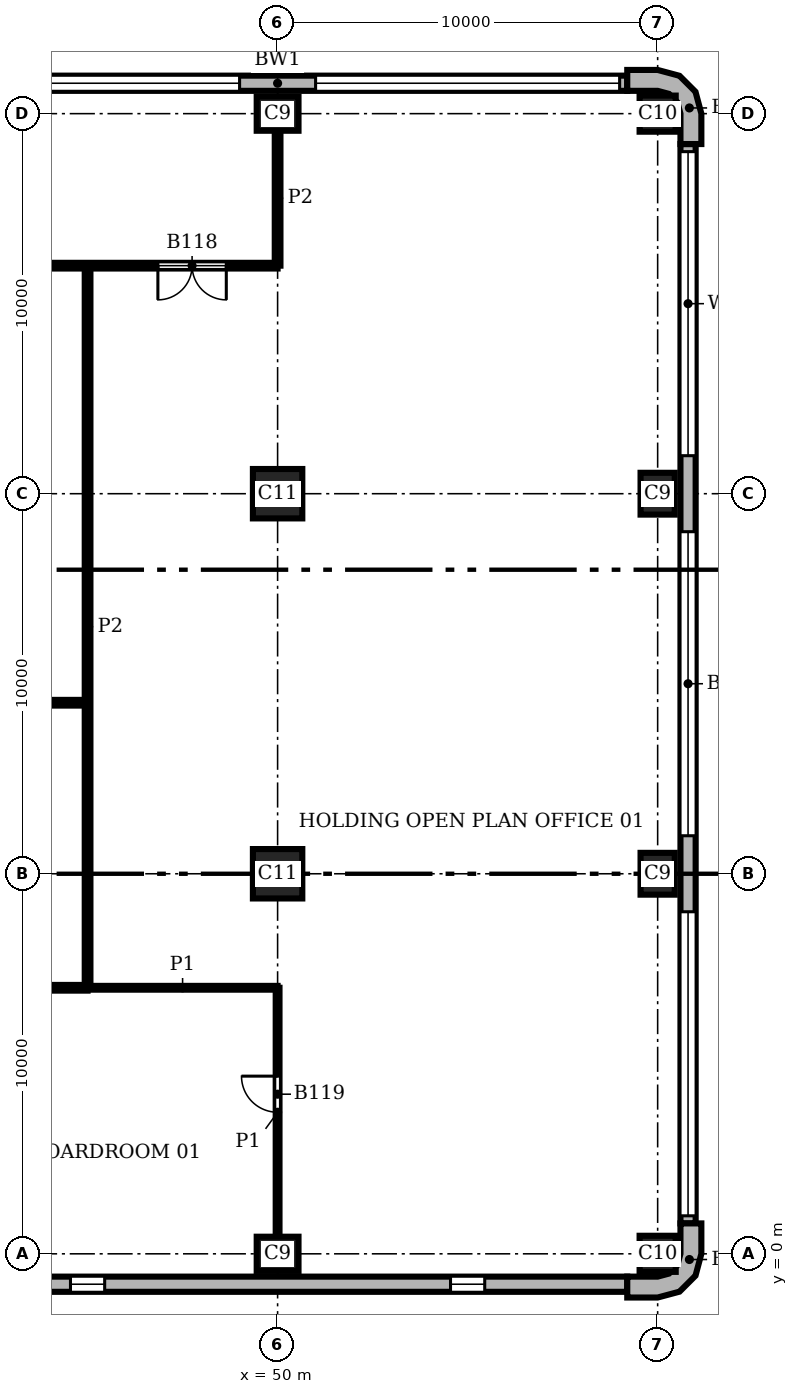
"""IFC4 building model, lengths in metres.
Left out: names, types, materials, properties, quantities, classifications, styles, units other than length and angle.
Written with IfcOpenShell. Run it as: python <this file> out.ifc"""

import sys

from ifc_helpers import new_model, si_unit, direction, frame, frame_2d, origin, origin_2d, place, context, subcontext, project, spatial, polyline, rectangle, outline, extrude, element, fill, save


model = new_model("IFC4")
c1 = context("Model", 3, precision=1e-05, world=origin(), true_north=direction((0.0, 1.0)))
c2 = subcontext(c1, "Body", "Model", "MODEL_VIEW")
j1 = project(units=[si_unit("LENGTHUNIT", "METRE"), si_unit("PLANEANGLEUNIT", "RADIAN")], contexts=[c1])
p1 = place(None, origin())
s1 = spatial("IfcSite", under=j1, at=p1, CompositionType="ELEMENT")
p2 = place(p1, origin())
s2 = spatial("IfcBuilding", under=s1, at=p2, CompositionType="ELEMENT")
p3 = place(p2, frame((0.0, 0.0, 131.7)))
s3 = spatial("IfcBuildingStorey", under=s2, at=p3, CompositionType="ELEMENT", Elevation=131.7)
p4 = place(p3, frame((50.0, 0.0, 0.0), z_axis=(0.0, 0.0, 1.0), x_axis=(1.0, 0.0, 0.0)))
e1 = element("IfcColumn", 1, at=p4, inside=s3, PredefinedType="COLUMN", context=c2, shape_type="SweptSolid", body=[
    extrude(rectangle(XDim=1.1, YDim=0.9, at=origin_2d()), origin(), (0.0, 0.0, 1.0), 3.9),
])
p5 = place(p3, frame((60.0, 0.0, 0.0), z_axis=(0.0, 0.0, 1.0), x_axis=(1.0, 0.0, 0.0)))
e2 = element("IfcColumn", 2, at=p5, inside=s3, PredefinedType="COLUMN", context=c2, shape_type="SweptSolid", body=[
    extrude(rectangle(XDim=0.95, YDim=0.95, at=origin_2d()), origin(), (0.0, 0.0, 1.0), 3.9),
])
for number, where, z_axis, x_axis in (
    (3, (60.0, 10.0, 0.0), (0.0, 0.0, 1.0), (0.0, 1.0, 0.0)),
    (4, (60.0, 20.0, 0.0), (0.0, 0.0, 1.0), (0.0, 1.0, 0.0)),
):
    element("IfcColumn", number, at=place(p3, frame(where, z_axis=z_axis, x_axis=x_axis)), inside=s3, PredefinedType="COLUMN", context=c2, shape_type="SweptSolid", body=[
        extrude(rectangle(XDim=1.1, YDim=0.9, at=origin_2d()), origin(), (0.0, 0.0, 1.0), 3.9),
    ])
p6 = place(p3, frame((60.0, 30.0, 0.0), z_axis=(0.0, 0.0, 1.0), x_axis=(1.0, 0.0, 0.0)))
e5 = element("IfcColumn", 5, at=p6, inside=s3, PredefinedType="COLUMN", context=c2, shape_type="SweptSolid", body=[
    extrude(rectangle(XDim=0.95, YDim=0.95, at=origin_2d()), origin(), (0.0, 0.0, 1.0), 3.9),
])
p7 = place(p3, frame((50.0, 30.0, 0.0), z_axis=(0.0, 0.0, 1.0), x_axis=(1.0, 0.0, 0.0)))
e6 = element("IfcColumn", 6, at=p7, inside=s3, PredefinedType="COLUMN", context=c2, shape_type="SweptSolid", body=[
    extrude(rectangle(XDim=1.1, YDim=0.9, at=origin_2d()), origin(), (0.0, 0.0, 1.0), 3.9),
])
for number, where, z_axis, x_axis in (
    (7, (50.0, 10.0, 0.0), (0.0, 0.0, 1.0), (1.0, 0.0, 0.0)),
    (8, (50.0, 20.0, 0.0), (0.0, 0.0, 1.0), (1.0, 0.0, 0.0)),
):
    element("IfcColumn", number, at=place(p3, frame(where, z_axis=z_axis, x_axis=x_axis)), inside=s3, PredefinedType="COLUMN", context=c2, shape_type="SweptSolid", body=[
        extrude(rectangle(XDim=1.3, YDim=1.3, at=origin_2d()), origin(), (0.0, 0.0, 1.0), 3.9),
    ])
p8 = place(p3, origin())
e9 = element("IfcWall", 9, at=p8, inside=s3, PredefinedType="SOLIDWALL", context=c2, shape_type="SweptSolid", body=[
    extrude(outline(polyline([(59.2, -1.0), (59.2, -1.15), (60.0, -1.15), (60.575, -0.996), (60.996, -0.575), (61.15, 0.0), (61.15, 0.8), (61.0, 0.8), (60.6, 0.8), (60.6, 0.0), (60.52, -0.3), (60.3, -0.52), (60.0, -0.6), (59.2, -0.6), (59.2, -1.0)])), origin(), (0.0, 0.0, 1.0), 3.9),
])
e10 = element("IfcWall", 10, at=p8, inside=s3, PredefinedType="SOLIDWALL", context=c2, shape_type="SweptSolid", body=[
    extrude(outline(polyline([(61.0, 29.2), (61.15, 29.2), (61.15, 30.0), (60.996, 30.575), (60.575, 30.996), (60.0, 31.15), (59.2, 31.15), (59.2, 31.0), (59.2, 30.6), (60.0, 30.6), (60.3, 30.52), (60.52, 30.3), (60.6, 30.0), (60.6, 29.2), (61.0, 29.2)])), origin(), (0.0, 0.0, 1.0), 3.9),
])
p9 = place(p3, frame((20.8, -0.8, 0.0), z_axis=(0.0, 0.0, 1.0), x_axis=(1.0, 0.0, 0.0)))
e11 = element("IfcWall", 11, at=p9, inside=s3, PredefinedType="SOLIDWALL", context=c2, shape_type="SweptSolid", body=[
    extrude(rectangle(XDim=38.4, YDim=0.4, at=frame_2d((19.2, 0.0))), origin(), (0.0, 0.0, 1.0), 3.9),
])
p10 = place(p9, frame((3.75, 0.0, 0.9)))
e12 = element("IfcOpeningElement", 12, at=p10, cuts=e11, PredefinedType="OPENING", context=c2, shape_type="SweptSolid", body=[
    extrude(rectangle(XDim=0.9, YDim=2.35, at=frame_2d((0.45, 1.175))), frame((0.0, 0.21, 0.0), z_axis=(0.0, -1.0, 0.0), x_axis=(1.0, 0.0, 0.0)), (0.0, 0.0, 1.0), 0.42),
])
p11 = place(p9, frame((13.75, 0.0, 0.9)))
e13 = element("IfcOpeningElement", 13, at=p11, cuts=e11, PredefinedType="OPENING", context=c2, shape_type="SweptSolid", body=[
    extrude(rectangle(XDim=0.9, YDim=2.35, at=frame_2d((0.45, 1.175))), frame((0.0, 0.21, 0.0), z_axis=(0.0, -1.0, 0.0), x_axis=(1.0, 0.0, 0.0)), (0.0, 0.0, 1.0), 0.42),
])
p12 = place(p9, frame((23.75, 0.0, 0.9)))
e14 = element("IfcOpeningElement", 14, at=p12, cuts=e11, PredefinedType="OPENING", context=c2, shape_type="SweptSolid", body=[
    extrude(rectangle(XDim=0.9, YDim=2.35, at=frame_2d((0.45, 1.175))), frame((0.0, 0.21, 0.0), z_axis=(0.0, -1.0, 0.0), x_axis=(1.0, 0.0, 0.0)), (0.0, 0.0, 1.0), 0.42),
])
p13 = place(p9, frame((33.75, 0.0, 0.9)))
e15 = element("IfcOpeningElement", 15, at=p13, cuts=e11, PredefinedType="OPENING", context=c2, shape_type="SweptSolid", body=[
    extrude(rectangle(XDim=0.9, YDim=2.35, at=frame_2d((0.45, 1.175))), frame((0.0, 0.21, 0.0), z_axis=(0.0, -1.0, 0.0), x_axis=(1.0, 0.0, 0.0)), (0.0, 0.0, 1.0), 0.42),
])
p14 = place(p3, frame((60.8, 0.8, 0.0), z_axis=(0.0, 0.0, 1.0), x_axis=(0.0, 1.0, 0.0)))
e16 = element("IfcWall", 16, at=p14, inside=s3, PredefinedType="SOLIDWALL", context=c2, shape_type="SweptSolid", body=[
    extrude(rectangle(XDim=28.4, YDim=0.4, at=frame_2d((14.2, 0.0))), origin(), (0.0, 0.0, 1.0), 3.9),
])
p15 = place(p14, frame((0.2, 0.0, 0.9)))
e17 = element("IfcOpeningElement", 17, at=p15, cuts=e16, PredefinedType="OPENING", context=c2, shape_type="SweptSolid", body=[
    extrude(rectangle(XDim=8.0, YDim=2.35, at=frame_2d((4.0, 1.175))), frame((0.0, 0.21, 0.0), z_axis=(0.0, -1.0, 0.0), x_axis=(1.0, 0.0, 0.0)), (0.0, 0.0, 1.0), 0.42),
])
p16 = place(p14, frame((10.2, 0.0, 0.9)))
e18 = element("IfcOpeningElement", 18, at=p16, cuts=e16, PredefinedType="OPENING", context=c2, shape_type="SweptSolid", body=[
    extrude(rectangle(XDim=8.0, YDim=2.35, at=frame_2d((4.0, 1.175))), frame((0.0, 0.21, 0.0), z_axis=(0.0, -1.0, 0.0), x_axis=(1.0, 0.0, 0.0)), (0.0, 0.0, 1.0), 0.42),
])
p17 = place(p14, frame((20.2, 0.0, 0.9)))
e19 = element("IfcOpeningElement", 19, at=p17, cuts=e16, PredefinedType="OPENING", context=c2, shape_type="SweptSolid", body=[
    extrude(rectangle(XDim=8.0, YDim=2.35, at=frame_2d((4.0, 1.175))), frame((0.0, 0.21, 0.0), z_axis=(0.0, -1.0, 0.0), x_axis=(1.0, 0.0, 0.0)), (0.0, 0.0, 1.0), 0.42),
])
p18 = place(p3, frame((59.2, 30.8, 0.0), z_axis=(0.0, 0.0, 1.0), x_axis=(-1.0, 0.0, 0.0)))
e20 = element("IfcWall", 20, at=p18, inside=s3, PredefinedType="SOLIDWALL", context=c2, shape_type="SweptSolid", body=[
    extrude(rectangle(XDim=18.4, YDim=0.4, at=frame_2d((9.2, 0.0))), origin(), (0.0, 0.0, 1.0), 3.9),
])
p19 = place(p18, frame((0.2, 0.0, 0.9)))
e21 = element("IfcOpeningElement", 21, at=p19, cuts=e20, PredefinedType="OPENING", context=c2, shape_type="SweptSolid", body=[
    extrude(rectangle(XDim=8.0, YDim=2.35, at=frame_2d((4.0, 1.175))), frame((0.0, 0.21, 0.0), z_axis=(0.0, -1.0, 0.0), x_axis=(1.0, 0.0, 0.0)), (0.0, 0.0, 1.0), 0.42),
])
p20 = place(p18, frame((10.2, 0.0, 0.9)))
e22 = element("IfcOpeningElement", 22, at=p20, cuts=e20, PredefinedType="OPENING", context=c2, shape_type="SweptSolid", body=[
    extrude(rectangle(XDim=8.0, YDim=2.35, at=frame_2d((4.0, 1.175))), frame((0.0, 0.21, 0.0), z_axis=(0.0, -1.0, 0.0), x_axis=(1.0, 0.0, 0.0)), (0.0, 0.0, 1.0), 0.42),
])
p21 = place(p3, frame((50.0, 0.45, 0.0), z_axis=(0.0, 0.0, 1.0), x_axis=(0.0, 1.0, 0.0)))
e23 = element("IfcWall", 23, at=p21, inside=s3, PredefinedType="PARTITIONING", context=c2, shape_type="SweptSolid", body=[
    extrude(rectangle(XDim=6.55, YDim=0.1, at=frame_2d((3.275, 0.0))), origin(), (0.0, 0.0, 1.0), 3.58),
])
p22 = place(p21, frame((3.275, 0.0, 0.0)))
e24 = element("IfcOpeningElement", 24, at=p22, cuts=e23, PredefinedType="OPENING", context=c2, shape_type="SweptSolid", body=[
    extrude(rectangle(XDim=0.95, YDim=2.1, at=frame_2d((0.475, 1.05))), frame((0.0, 0.06, 0.0), z_axis=(0.0, -1.0, 0.0), x_axis=(1.0, 0.0, 0.0)), (0.0, 0.0, 1.0), 0.12),
])
p23 = place(p3, frame((45.0, 7.0, 0.0), z_axis=(0.0, 0.0, 1.0), x_axis=(1.0, 0.0, 0.0)))
e25 = element("IfcWall", 25, at=p23, inside=s3, PredefinedType="PARTITIONING", context=c2, shape_type="SweptSolid", body=[
    extrude(rectangle(XDim=5.0, YDim=0.1, at=frame_2d((2.5, 0.0))), origin(), (0.0, 0.0, 1.0), 3.58),
])
p24 = place(p3, frame((45.0, 7.0, 0.0), z_axis=(0.0, 0.0, 1.0), x_axis=(0.0, 1.0, 0.0)))
e26 = element("IfcWall", 26, at=p24, inside=s3, PredefinedType="PARTITIONING", context=c2, shape_type="SweptSolid", body=[
    extrude(rectangle(XDim=19.0, YDim=0.15, at=frame_2d((9.5, 0.0))), origin(), (0.0, 0.0, 1.0), 3.58),
])
p25 = place(p3, frame((50.0, 26.0, 0.0), z_axis=(0.0, 0.0, 1.0), x_axis=(0.0, 1.0, 0.0)))
e27 = element("IfcWall", 27, at=p25, inside=s3, PredefinedType="PARTITIONING", context=c2, shape_type="SweptSolid", body=[
    extrude(rectangle(XDim=3.55, YDim=0.15, at=frame_2d((1.775, 0.0))), origin(), (0.0, 0.0, 1.0), 3.58),
])
p26 = place(p3, frame((38.0, 7.0, 0.0), z_axis=(0.0, 0.0, 1.0), x_axis=(1.0, 0.0, 0.0)))
e28 = element("IfcWall", 28, at=p26, inside=s3, PredefinedType="PARTITIONING", context=c2, shape_type="SweptSolid", body=[
    extrude(rectangle(XDim=7.0, YDim=0.15, at=frame_2d((3.5, 0.0))), origin(), (0.0, 0.0, 1.0), 3.58),
])
p27 = place(p3, frame((35.6, 14.5, 0.0), z_axis=(0.0, 0.0, 1.0), x_axis=(1.0, 0.0, 0.0)))
e29 = element("IfcWall", 29, at=p27, inside=s3, PredefinedType="PARTITIONING", context=c2, shape_type="SweptSolid", body=[
    extrude(rectangle(XDim=9.4, YDim=0.15, at=frame_2d((4.7, 0.0))), origin(), (0.0, 0.0, 1.0), 3.58),
])
p28 = place(p3, frame((33.2, 26.0, 0.0), z_axis=(0.0, 0.0, 1.0), x_axis=(1.0, 0.0, 0.0)))
e30 = element("IfcWall", 30, at=p28, inside=s3, PredefinedType="PARTITIONING", context=c2, shape_type="SweptSolid", body=[
    extrude(rectangle(XDim=16.8, YDim=0.15, at=frame_2d((8.4, 0.0))), origin(), (0.0, 0.0, 1.0), 3.58),
])
p29 = place(p28, frame((5.85, 0.0, 0.0)))
e31 = element("IfcOpeningElement", 31, at=p29, cuts=e30, PredefinedType="OPENING", context=c2, shape_type="SweptSolid", body=[
    extrude(rectangle(XDim=1.0, YDim=2.1, at=frame_2d((0.5, 1.05))), frame((0.0, 0.085, 0.0), z_axis=(0.0, -1.0, 0.0), x_axis=(1.0, 0.0, 0.0)), (0.0, 0.0, 1.0), 0.17),
])
p30 = place(p28, frame((13.65, 0.0, 0.0)))
e32 = element("IfcOpeningElement", 32, at=p30, cuts=e30, PredefinedType="OPENING", context=c2, shape_type="SweptSolid", body=[
    extrude(rectangle(XDim=1.8, YDim=2.1, at=frame_2d((0.9, 1.05))), frame((0.0, 0.085, 0.0), z_axis=(0.0, -1.0, 0.0), x_axis=(1.0, 0.0, 0.0)), (0.0, 0.0, 1.0), 0.17),
])
p31 = place(p12, origin())
e33 = element("IfcWindow", 33, at=p31, inside=s3, PartitioningType="SINGLE_PANEL", PredefinedType="WINDOW", context=c2, shape_type="SweptSolid", body=[
    extrude(rectangle(XDim=0.9, YDim=2.35, at=frame_2d((0.45, 1.175))), frame((0.0, 0.16, 0.0), z_axis=(0.0, -1.0, 0.0), x_axis=(1.0, 0.0, 0.0)), (0.0, 0.0, 1.0), 0.06),
])
fill(e14, e33)
p32 = place(p13, origin())
e34 = element("IfcWindow", 34, at=p32, inside=s3, PartitioningType="SINGLE_PANEL", PredefinedType="WINDOW", context=c2, shape_type="SweptSolid", body=[
    extrude(rectangle(XDim=0.9, YDim=2.35, at=frame_2d((0.45, 1.175))), frame((0.0, 0.16, 0.0), z_axis=(0.0, -1.0, 0.0), x_axis=(1.0, 0.0, 0.0)), (0.0, 0.0, 1.0), 0.06),
])
fill(e15, e34)
p33 = place(p15, origin())
e35 = element("IfcWindow", 35, at=p33, inside=s3, PartitioningType="SINGLE_PANEL", PredefinedType="WINDOW", context=c2, shape_type="SweptSolid", body=[
    extrude(rectangle(XDim=8.0, YDim=2.35, at=frame_2d((4.0, 1.175))), frame((0.0, 0.16, 0.0), z_axis=(0.0, -1.0, 0.0), x_axis=(1.0, 0.0, 0.0)), (0.0, 0.0, 1.0), 0.06),
])
fill(e17, e35)
p34 = place(p16, origin())
e36 = element("IfcWindow", 36, at=p34, inside=s3, PartitioningType="SINGLE_PANEL", PredefinedType="WINDOW", context=c2, shape_type="SweptSolid", body=[
    extrude(rectangle(XDim=8.0, YDim=2.35, at=frame_2d((4.0, 1.175))), frame((0.0, 0.16, 0.0), z_axis=(0.0, -1.0, 0.0), x_axis=(1.0, 0.0, 0.0)), (0.0, 0.0, 1.0), 0.06),
])
fill(e18, e36)
p35 = place(p17, origin())
e37 = element("IfcWindow", 37, at=p35, inside=s3, PartitioningType="SINGLE_PANEL", PredefinedType="WINDOW", context=c2, shape_type="SweptSolid", body=[
    extrude(rectangle(XDim=8.0, YDim=2.35, at=frame_2d((4.0, 1.175))), frame((0.0, 0.16, 0.0), z_axis=(0.0, -1.0, 0.0), x_axis=(1.0, 0.0, 0.0)), (0.0, 0.0, 1.0), 0.06),
])
fill(e19, e37)
p36 = place(p19, origin())
e38 = element("IfcWindow", 38, at=p36, inside=s3, PartitioningType="SINGLE_PANEL", PredefinedType="WINDOW", context=c2, shape_type="SweptSolid", body=[
    extrude(rectangle(XDim=8.0, YDim=2.35, at=frame_2d((4.0, 1.175))), frame((0.0, 0.16, 0.0), z_axis=(0.0, -1.0, 0.0), x_axis=(1.0, 0.0, 0.0)), (0.0, 0.0, 1.0), 0.06),
])
fill(e21, e38)
p37 = place(p20, origin())
e39 = element("IfcWindow", 39, at=p37, inside=s3, PartitioningType="SINGLE_PANEL", PredefinedType="WINDOW", context=c2, shape_type="SweptSolid", body=[
    extrude(rectangle(XDim=8.0, YDim=2.35, at=frame_2d((4.0, 1.175))), frame((0.0, 0.16, 0.0), z_axis=(0.0, -1.0, 0.0), x_axis=(1.0, 0.0, 0.0)), (0.0, 0.0, 1.0), 0.06),
])
fill(e22, e39)
p38 = place(p30, frame((1.8, 0.0, 0.0), z_axis=(0.0, 0.0, 1.0), x_axis=(-1.0, 0.0, 0.0)))
e40 = element("IfcDoor", 40, at=p38, inside=s3, OperationType="DOUBLE_DOOR_SINGLE_SWING", PredefinedType="DOOR", context=c2, shape_type="SweptSolid", body=[
    extrude(rectangle(XDim=1.8, YDim=2.1, at=frame_2d((0.9, 1.05))), frame((0.0, 0.025, 0.0), z_axis=(0.0, -1.0, 0.0), x_axis=(1.0, 0.0, 0.0)), (0.0, 0.0, 1.0), 0.05),
])
fill(e32, e40)
p39 = place(p22, origin())
e41 = element("IfcDoor", 41, at=p39, inside=s3, OperationType="SINGLE_SWING_RIGHT", PredefinedType="DOOR", context=c2, shape_type="SweptSolid", body=[
    extrude(rectangle(XDim=0.95, YDim=2.1, at=frame_2d((0.475, 1.05))), frame((0.0, 0.025, 0.0), z_axis=(0.0, -1.0, 0.0), x_axis=(1.0, 0.0, 0.0)), (0.0, 0.0, 1.0), 0.05),
])
fill(e24, e41)
save(model, sys.argv[1])
